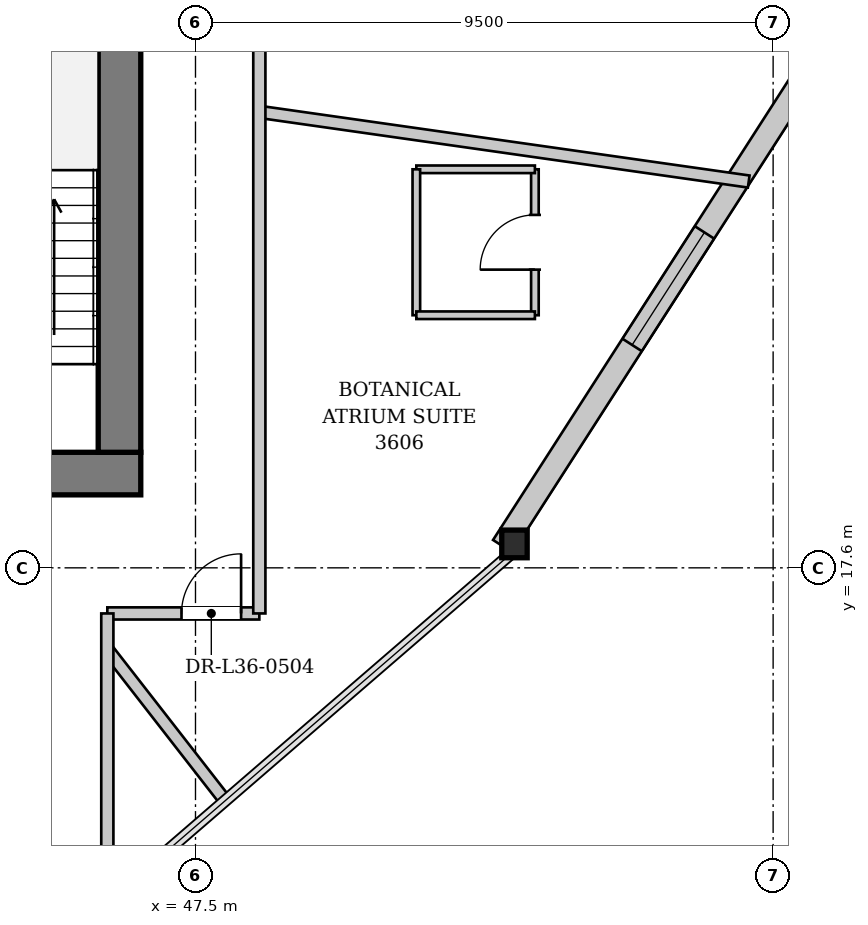
"""IFC4 building model, lengths in metres.
Left out: names, types, materials, properties, quantities, classifications, styles, units other than length and angle.
Written with IfcOpenShell. Run it as: python <this file> out.ifc"""

import sys

from ifc_helpers import new_model, si_unit, direction, frame, frame_2d, origin, origin_2d, place, context, subcontext, project, spatial, rectangle, i_section, extrude, source, transform, mapped, element, fill, save


model = new_model("IFC4")
c1 = context("Model", 3, precision=1e-05, world=origin(), true_north=direction((0.0, 1.0)))
c2 = subcontext(c1, "Body", "Model", "MODEL_VIEW")
j1 = project(units=[si_unit("LENGTHUNIT", "METRE"), si_unit("PLANEANGLEUNIT", "RADIAN")], contexts=[c1])
p1 = place(None, origin())
s1 = spatial("IfcSite", under=j1, at=p1, CompositionType="ELEMENT")
p2 = place(p1, origin())
s2 = spatial("IfcBuilding", under=s1, at=p2, CompositionType="ELEMENT")
p3 = place(p2, frame((0.0, 0.0, 138.1)))
s3 = spatial("IfcBuildingStorey", under=s2, at=p3, CompositionType="ELEMENT", Elevation=138.1)
m1 = source(origin(), c2, "Body", "SweptSolid", [
    extrude(i_section(OverallWidth=0.418, OverallDepth=0.455, WebThickness=0.038, FlangeThickness=0.059, at=origin_2d()), origin(), (0.0, 0.0, 1.0), 3.846),
])
p4 = place(p3, frame((52.713, 17.853, 0.0), z_axis=(0.016949823802, 0.073068341557, 0.99718289242), x_axis=(-0.974133806588, 0.225971960347, 0.0)))
e1 = element("IfcColumn", 1, at=p4, inside=s3, PredefinedType="COLUMN", context=c2, shape_type="MappedRepresentation", body=[
    mapped(m1, transform((0.0, 0.0, 0.0), x_axis=(1.0, 0.0, 0.0), y_axis=(0.0, 1.0, 0.0), z_axis=(0.0, 0.0, 1.0), scale=1.0)),
])
p5 = place(p3, frame((65.364, 37.887, 0.0), z_axis=(0.0, 0.0, 1.0), x_axis=(-0.540678429376, -0.84122935993, 0.0)))
e2 = element("IfcWall", 2, at=p5, inside=s3, PredefinedType="SOLIDWALL", context=c2, shape_type="SweptSolid", body=[
    extrude(rectangle(XDim=23.693, YDim=0.38, at=frame_2d((11.847, 0.0))), origin(), (0.0, 0.0, 1.0), 2.972),
])
p6 = place(p5, frame((5.534, 0.0, 0.602)))
e3 = element("IfcOpeningElement", 3, at=p6, cuts=e2, PredefinedType="OPENING", context=c2, shape_type="SweptSolid", body=[
    extrude(rectangle(XDim=2.2, YDim=2.25, at=frame_2d((1.1, 1.125))), frame((0.0, 0.2, 0.0), z_axis=(0.0, -1.0, 0.0), x_axis=(1.0, 0.0, 0.0)), (0.0, 0.0, 1.0), 0.4),
])
p7 = place(p5, frame((17.559, 0.0, 0.602)))
e4 = element("IfcOpeningElement", 4, at=p7, cuts=e2, PredefinedType="OPENING", context=c2, shape_type="SweptSolid", body=[
    extrude(rectangle(XDim=2.2, YDim=2.25, at=frame_2d((1.1, 1.125))), frame((0.0, 0.2, 0.0), z_axis=(0.0, -1.0, 0.0), x_axis=(1.0, 0.0, 0.0)), (0.0, 0.0, 1.0), 0.4),
])
p8 = place(p3, frame((46.6, 19.15, 0.0), z_axis=(0.0, 0.0, 1.0), x_axis=(-1.0, 0.0, 0.0)))
e5 = element("IfcWall", 5, at=p8, inside=s3, PredefinedType="SHEAR", context=c2, shape_type="SweptSolid", body=[
    extrude(rectangle(XDim=17.2, YDim=0.7, at=frame_2d((8.6, 0.0))), origin(), (0.0, 0.0, 1.0), 3.58),
])
p9 = place(p8, frame((4.8, 0.0, 0.0)))
e6 = element("IfcOpeningElement", 6, at=p9, cuts=e5, PredefinedType="OPENING", context=c2, shape_type="SweptSolid", body=[
    extrude(rectangle(XDim=1.12, YDim=2.25, at=frame_2d((0.56, 1.125))), frame((0.0, 0.36, 0.0), z_axis=(0.0, -1.0, 0.0), x_axis=(1.0, 0.0, 0.0)), (0.0, 0.0, 1.0), 0.72),
])
p10 = place(p8, frame((11.3, 0.0, 0.0)))
e7 = element("IfcOpeningElement", 7, at=p10, cuts=e5, PredefinedType="OPENING", context=c2, shape_type="SweptSolid", body=[
    extrude(rectangle(XDim=1.12, YDim=2.25, at=frame_2d((0.56, 1.125))), frame((0.0, 0.36, 0.0), z_axis=(0.0, -1.0, 0.0), x_axis=(1.0, 0.0, 0.0)), (0.0, 0.0, 1.0), 0.72),
])
p11 = place(p3, frame((46.25, 33.7, 0.0), z_axis=(0.0, 0.0, 1.0), x_axis=(0.0, -1.0, 0.0)))
e8 = element("IfcWall", 8, at=p11, inside=s3, PredefinedType="SHEAR", context=c2, shape_type="SweptSolid", body=[
    extrude(rectangle(XDim=14.2, YDim=0.7, at=frame_2d((7.1, 0.0))), origin(), (0.0, 0.0, 1.0), 3.58),
])
p12 = place(p11, frame((5.18, 0.0, 0.0)))
e9 = element("IfcOpeningElement", 9, at=p12, cuts=e8, PredefinedType="OPENING", context=c2, shape_type="SweptSolid", body=[
    extrude(rectangle(XDim=1.6, YDim=2.2, at=frame_2d((0.8, 1.1))), frame((0.0, 0.36, 0.0), z_axis=(0.0, -1.0, 0.0), x_axis=(1.0, 0.0, 0.0)), (0.0, 0.0, 1.0), 0.72),
])
p13 = place(p3, frame((46.05, 16.259, 0.0), z_axis=(0.0, 0.0, 1.0), x_axis=(0.614254285098, -0.789108150533, 0.0)))
e10 = element("IfcWall", 10, at=p13, inside=s3, PredefinedType="PARTITIONING", context=c2, shape_type="SweptSolid", body=[
    extrude(rectangle(XDim=3.125, YDim=0.2, at=frame_2d((1.562, 0.0))), origin(), (0.0, 0.0, 1.0), 3.58),
])
p14 = place(p3, frame((48.55, 25.098, 0.0), z_axis=(0.0, 0.0, 1.0), x_axis=(0.990022637943, -0.140908397052, 0.0)))
e11 = element("IfcWall", 11, at=p14, inside=s3, PredefinedType="PARTITIONING", context=c2, shape_type="SweptSolid", body=[
    extrude(rectangle(XDim=8.129, YDim=0.2, at=frame_2d((4.065, 0.0))), origin(), (0.0, 0.0, 1.0), 3.58),
])
p15 = place(p3, frame((53.082, 21.754, 0.0), z_axis=(0.0, 0.0, 1.0), x_axis=(0.0, 1.0, 0.0)))
e12 = element("IfcWall", 12, at=p15, inside=s3, PredefinedType="PARTITIONING", context=c2, shape_type="SweptSolid", body=[
    extrude(rectangle(XDim=2.4, YDim=0.125, at=frame_2d((1.2, 0.0))), origin(), (0.0, 0.0, 1.0), 3.58),
])
p16 = place(p15, frame((0.75, 0.0, 0.0)))
e13 = element("IfcOpeningElement", 13, at=p16, cuts=e12, PredefinedType="OPENING", context=c2, shape_type="SweptSolid", body=[
    extrude(rectangle(XDim=0.9, YDim=2.1, at=frame_2d((0.45, 1.05))), frame((0.0, 0.073, 0.0), z_axis=(0.0, -1.0, 0.0), x_axis=(1.0, 0.0, 0.0)), (0.0, 0.0, 1.0), 0.145),
])
p17 = place(p3, frame((53.082, 24.154, 0.0), z_axis=(0.0, 0.0, 1.0), x_axis=(-1.0, 0.0, 0.0)))
e14 = element("IfcWall", 14, at=p17, inside=s3, PredefinedType="PARTITIONING", context=c2, shape_type="SweptSolid", body=[
    extrude(rectangle(XDim=1.95, YDim=0.125, at=frame_2d((0.975, 0.0))), origin(), (0.0, 0.0, 1.0), 3.58),
])
p18 = place(p3, frame((51.132, 24.154, 0.0), z_axis=(0.0, 0.0, 1.0), x_axis=(0.0, -1.0, 0.0)))
e15 = element("IfcWall", 15, at=p18, inside=s3, PredefinedType="PARTITIONING", context=c2, shape_type="SweptSolid", body=[
    extrude(rectangle(XDim=2.4, YDim=0.125, at=frame_2d((1.2, 0.0))), origin(), (0.0, 0.0, 1.0), 3.58),
])
p19 = place(p3, frame((51.132, 21.754, 0.0), z_axis=(0.0, 0.0, 1.0), x_axis=(1.0, 0.0, 0.0)))
e16 = element("IfcWall", 16, at=p19, inside=s3, PredefinedType="PARTITIONING", context=c2, shape_type="SweptSolid", body=[
    extrude(rectangle(XDim=1.95, YDim=0.125, at=frame_2d((0.975, 0.0))), origin(), (0.0, 0.0, 1.0), 3.58),
])
p20 = place(p3, frame((46.05, 16.85, 0.0), z_axis=(0.0, 0.0, 1.0), x_axis=(1.0, 0.0, 0.0)))
e17 = element("IfcWall", 17, at=p20, inside=s3, PredefinedType="PARTITIONING", context=c2, shape_type="SweptSolid", body=[
    extrude(rectangle(XDim=2.5, YDim=0.2, at=frame_2d((1.25, 0.0))), origin(), (0.0, 0.0, 1.0), 3.58),
])
p21 = place(p20, frame((1.22, 0.0, 0.0)))
e18 = element("IfcOpeningElement", 18, at=p21, cuts=e17, PredefinedType="OPENING", context=c2, shape_type="SweptSolid", body=[
    extrude(rectangle(XDim=0.98, YDim=2.15, at=frame_2d((0.49, 1.075))), frame((0.0, 0.11, 0.0), z_axis=(0.0, -1.0, 0.0), x_axis=(1.0, 0.0, 0.0)), (0.0, 0.0, 1.0), 0.22),
])
p22 = place(p3, frame((48.55, 16.85, 0.0), z_axis=(0.0, 0.0, 1.0), x_axis=(0.0, 1.0, 0.0)))
e19 = element("IfcWall", 19, at=p22, inside=s3, PredefinedType="PARTITIONING", context=c2, shape_type="SweptSolid", body=[
    extrude(rectangle(XDim=19.5, YDim=0.2, at=frame_2d((9.75, 0.0))), origin(), (0.0, 0.0, 1.0), 3.58),
])
p23 = place(p22, frame((11.322, 0.0, 0.0)))
e20 = element("IfcOpeningElement", 20, at=p23, cuts=e19, PredefinedType="OPENING", context=c2, shape_type="SweptSolid", body=[
    extrude(rectangle(XDim=0.98, YDim=2.15, at=frame_2d((0.49, 1.075))), frame((0.0, 0.11, 0.0), z_axis=(0.0, -1.0, 0.0), x_axis=(1.0, 0.0, 0.0)), (0.0, 0.0, 1.0), 0.22),
])
p24 = place(p3, frame((46.05, 12.55, 0.0), z_axis=(0.0, 0.0, 1.0), x_axis=(0.0, 1.0, 0.0)))
e21 = element("IfcWall", 21, at=p24, inside=s3, PredefinedType="PARTITIONING", context=c2, shape_type="SweptSolid", body=[
    extrude(rectangle(XDim=4.3, YDim=0.2, at=frame_2d((2.15, 0.0))), origin(), (0.0, 0.0, 1.0), 3.58),
])
m2 = source(origin(), c2, "Body", "SweptSolid", [
    extrude(rectangle(XDim=2.2, YDim=2.25, at=frame_2d((1.1, 1.125))), frame((0.0, 0.03, 0.0), z_axis=(0.0, -1.0, 0.0), x_axis=(1.0, 0.0, 0.0)), (0.0, 0.0, 1.0), 0.06),
])
p25 = place(p7, origin())
e22 = element("IfcWindow", 22, at=p25, inside=s3, PartitioningType="SINGLE_PANEL", PredefinedType="WINDOW", context=c2, shape_type="MappedRepresentation", body=[
    mapped(m2, transform((0.0, 0.0, 0.0), x_axis=(1.0, 0.0, 0.0), y_axis=(0.0, 1.0, 0.0), z_axis=(0.0, 0.0, 1.0), scale=1.0)),
])
fill(e4, e22)
m3 = source(origin(), c2, "Body", "SweptSolid", [
    extrude(rectangle(XDim=0.9, YDim=2.1, at=frame_2d((0.45, 1.05))), frame((0.0, 0.025, 0.0), z_axis=(0.0, -1.0, 0.0), x_axis=(1.0, 0.0, 0.0)), (0.0, 0.0, 1.0), 0.05),
])
p26 = place(p16, origin())
e23 = element("IfcDoor", 23, at=p26, inside=s3, OperationType="SINGLE_SWING_LEFT", PredefinedType="DOOR", context=c2, shape_type="MappedRepresentation", body=[
    mapped(m3, transform((0.0, 0.0, 0.0), x_axis=(1.0, 0.0, 0.0), y_axis=(0.0, 1.0, 0.0), z_axis=(0.0, 0.0, 1.0), scale=1.0)),
])
fill(e13, e23)
m4 = source(origin(), c2, "Body", "SweptSolid", [
    extrude(rectangle(XDim=0.98, YDim=2.15, at=frame_2d((0.49, 1.075))), frame((0.0, 0.025, 0.0), z_axis=(0.0, -1.0, 0.0), x_axis=(1.0, 0.0, 0.0)), (0.0, 0.0, 1.0), 0.05),
])
p27 = place(p21, origin())
e24 = element("IfcDoor", 24, at=p27, inside=s3, OperationType="SINGLE_SWING_RIGHT", PredefinedType="DOOR", context=c2, shape_type="MappedRepresentation", body=[
    mapped(m4, transform((0.0, 0.0, 0.0), x_axis=(1.0, 0.0, 0.0), y_axis=(0.0, 1.0, 0.0), z_axis=(0.0, 0.0, 1.0), scale=1.0)),
])
fill(e18, e24)
save(model, sys.argv[1])
